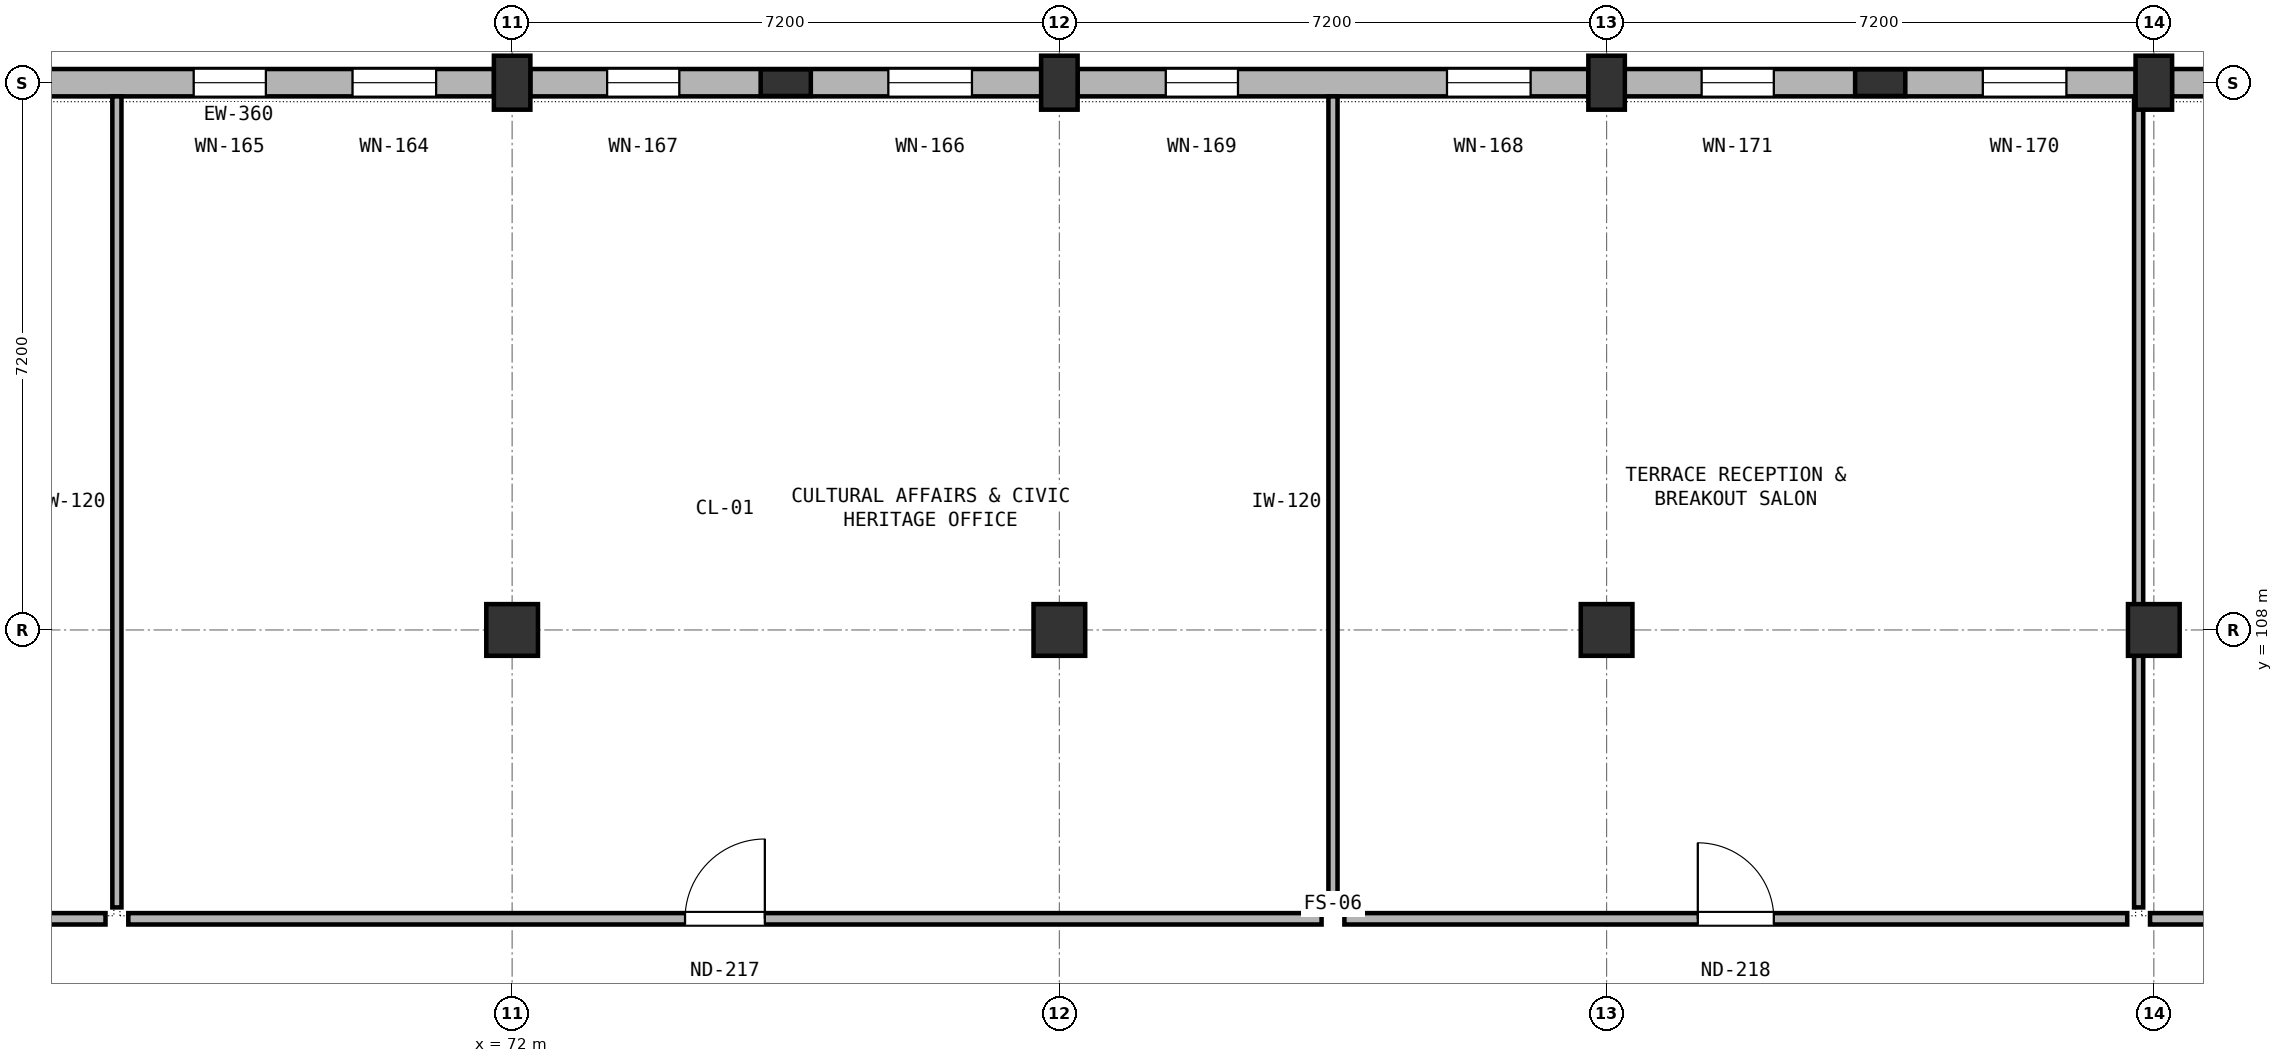
"""IFC4 building model, lengths in metres.
Left out: names, types, materials, properties, quantities, classifications, styles, units other than length and angle.
Written with IfcOpenShell. Run it as: python <this file> out.ifc"""

import sys

from ifc_helpers import new_model, si_unit, direction, frame, frame_2d, origin, origin_2d, place, context, subcontext, project, spatial, rectangle, extrude, element, fill, save


model = new_model("IFC4")
c1 = context("Model", 3, precision=1e-05, world=origin(), true_north=direction((0.0, 1.0)))
c2 = subcontext(c1, "Body", "Model", "MODEL_VIEW")
j1 = project(units=[si_unit("LENGTHUNIT", "METRE"), si_unit("PLANEANGLEUNIT", "RADIAN")], contexts=[c1])
p1 = place(None, origin())
s1 = spatial("IfcSite", under=j1, at=p1, CompositionType="ELEMENT")
p2 = place(p1, origin())
s2 = spatial("IfcBuilding", under=s1, at=p2, CompositionType="ELEMENT")
p3 = place(p2, frame((0.0, 0.0, 22.5)))
s3 = spatial("IfcBuildingStorey", under=s2, at=p3, CompositionType="ELEMENT", Elevation=22.5)
p4 = place(p3, frame((72.0, 108.0, 0.0), z_axis=(0.0, 0.0, 1.0), x_axis=(1.0, 0.0, 0.0)))
e1 = element("IfcColumn", 1, at=p4, inside=s3, PredefinedType="COLUMN", context=c2, shape_type="SweptSolid", body=[
    extrude(rectangle(XDim=0.68, YDim=0.68, at=origin_2d()), origin(), (0.0, 0.0, 1.0), 3.9),
])
p5 = place(p3, frame((72.0, 115.2, 0.0), z_axis=(0.0, 0.0, 1.0), x_axis=(1.0, 0.0, 0.0)))
e2 = element("IfcColumn", 2, at=p5, inside=s3, PredefinedType="COLUMN", context=c2, shape_type="SweptSolid", body=[
    extrude(rectangle(XDim=0.48, YDim=0.71, at=origin_2d()), origin(), (0.0, 0.0, 1.0), 3.9),
])
p6 = place(p3, frame((79.2, 108.0, 0.0), z_axis=(0.0, 0.0, 1.0), x_axis=(1.0, 0.0, 0.0)))
e3 = element("IfcColumn", 3, at=p6, inside=s3, PredefinedType="COLUMN", context=c2, shape_type="SweptSolid", body=[
    extrude(rectangle(XDim=0.68, YDim=0.68, at=origin_2d()), origin(), (0.0, 0.0, 1.0), 3.9),
])
p7 = place(p3, frame((79.2, 115.2, 0.0), z_axis=(0.0, 0.0, 1.0), x_axis=(1.0, 0.0, 0.0)))
e4 = element("IfcColumn", 4, at=p7, inside=s3, PredefinedType="COLUMN", context=c2, shape_type="SweptSolid", body=[
    extrude(rectangle(XDim=0.48, YDim=0.71, at=origin_2d()), origin(), (0.0, 0.0, 1.0), 3.9),
])
p8 = place(p3, frame((86.4, 108.0, 0.0), z_axis=(0.0, 0.0, 1.0), x_axis=(1.0, 0.0, 0.0)))
e5 = element("IfcColumn", 5, at=p8, inside=s3, PredefinedType="COLUMN", context=c2, shape_type="SweptSolid", body=[
    extrude(rectangle(XDim=0.68, YDim=0.68, at=origin_2d()), origin(), (0.0, 0.0, 1.0), 3.9),
])
p9 = place(p3, frame((86.4, 115.2, 0.0), z_axis=(0.0, 0.0, 1.0), x_axis=(1.0, 0.0, 0.0)))
e6 = element("IfcColumn", 6, at=p9, inside=s3, PredefinedType="COLUMN", context=c2, shape_type="SweptSolid", body=[
    extrude(rectangle(XDim=0.48, YDim=0.71, at=origin_2d()), origin(), (0.0, 0.0, 1.0), 3.9),
])
p10 = place(p3, frame((93.6, 108.0, 0.0), z_axis=(0.0, 0.0, 1.0), x_axis=(1.0, 0.0, 0.0)))
e7 = element("IfcColumn", 7, at=p10, inside=s3, PredefinedType="COLUMN", context=c2, shape_type="SweptSolid", body=[
    extrude(rectangle(XDim=0.68, YDim=0.68, at=origin_2d()), origin(), (0.0, 0.0, 1.0), 3.9),
])
p11 = place(p3, frame((93.6, 115.2, 0.0), z_axis=(0.0, 0.0, 1.0), x_axis=(1.0, 0.0, 0.0)))
e8 = element("IfcColumn", 8, at=p11, inside=s3, PredefinedType="COLUMN", context=c2, shape_type="SweptSolid", body=[
    extrude(rectangle(XDim=0.48, YDim=0.71, at=origin_2d()), origin(), (0.0, 0.0, 1.0), 3.9),
])
for number, where, z_axis, x_axis in (
    (9, (75.6, 115.2, 0.0), (0.0, 0.0, 1.0), (1.0, 0.0, 0.0)),
    (10, (90.0, 115.2, 0.0), (0.0, 0.0, 1.0), (1.0, 0.0, 0.0)),
):
    element("IfcColumn", number, at=place(p3, frame(where, z_axis=z_axis, x_axis=x_axis)), inside=s3, PredefinedType="PILASTER", context=c2, shape_type="SweptSolid", body=[
        extrude(rectangle(XDim=0.66, YDim=0.35, at=origin_2d()), origin(), (0.0, 0.0, 1.0), 3.9),
    ])
p12 = place(p3, frame((71.762, 115.2, 0.0), z_axis=(0.0, 0.0, 1.0), x_axis=(-1.0, 0.0, 0.0)))
e11 = element("IfcWall", 11, at=p12, inside=s3, PredefinedType="SOLIDWALL", context=c2, shape_type="SweptSolid", body=[
    extrude(rectangle(XDim=6.724, YDim=0.36, at=frame_2d((3.362, 0.0))), origin(), (0.0, 0.0, 1.0), 2.74),
])
p13 = place(p12, frame((0.762, 0.0, 0.7)))
e12 = element("IfcOpeningElement", 12, at=p13, cuts=e11, PredefinedType="OPENING", context=c2, shape_type="SweptSolid", body=[
    extrude(rectangle(XDim=1.1, YDim=1.84, at=frame_2d((0.55, 0.92))), frame((0.0, 0.19, 0.0), z_axis=(0.0, -1.0, 0.0), x_axis=(1.0, 0.0, 0.0)), (0.0, 0.0, 1.0), 0.38),
])
p14 = place(p12, frame((3.002, 0.0, 0.7)))
e13 = element("IfcOpeningElement", 13, at=p14, cuts=e11, PredefinedType="OPENING", context=c2, shape_type="SweptSolid", body=[
    extrude(rectangle(XDim=0.95, YDim=1.84, at=frame_2d((0.475, 0.92))), frame((0.0, 0.19, 0.0), z_axis=(0.0, -1.0, 0.0), x_axis=(1.0, 0.0, 0.0)), (0.0, 0.0, 1.0), 0.38),
])
p15 = place(p3, frame((78.962, 115.2, 0.0), z_axis=(0.0, 0.0, 1.0), x_axis=(-1.0, 0.0, 0.0)))
e14 = element("IfcWall", 14, at=p15, inside=s3, PredefinedType="SOLIDWALL", context=c2, shape_type="SweptSolid", body=[
    extrude(rectangle(XDim=6.724, YDim=0.36, at=frame_2d((3.362, 0.0))), origin(), (0.0, 0.0, 1.0), 2.74),
])
p16 = place(p15, frame((0.912, 0.0, 0.7)))
e15 = element("IfcOpeningElement", 15, at=p16, cuts=e14, PredefinedType="OPENING", context=c2, shape_type="SweptSolid", body=[
    extrude(rectangle(XDim=1.1, YDim=1.84, at=frame_2d((0.55, 0.92))), frame((0.0, 0.19, 0.0), z_axis=(0.0, -1.0, 0.0), x_axis=(1.0, 0.0, 0.0)), (0.0, 0.0, 1.0), 0.38),
])
p17 = place(p15, frame((4.762, 0.0, 0.7)))
e16 = element("IfcOpeningElement", 16, at=p17, cuts=e14, PredefinedType="OPENING", context=c2, shape_type="SweptSolid", body=[
    extrude(rectangle(XDim=0.95, YDim=1.84, at=frame_2d((0.475, 0.92))), frame((0.0, 0.19, 0.0), z_axis=(0.0, -1.0, 0.0), x_axis=(1.0, 0.0, 0.0)), (0.0, 0.0, 1.0), 0.38),
])
p18 = place(p3, frame((86.162, 115.2, 0.0), z_axis=(0.0, 0.0, 1.0), x_axis=(-1.0, 0.0, 0.0)))
e17 = element("IfcWall", 17, at=p18, inside=s3, PredefinedType="SOLIDWALL", context=c2, shape_type="SweptSolid", body=[
    extrude(rectangle(XDim=6.724, YDim=0.36, at=frame_2d((3.362, 0.0))), origin(), (0.0, 0.0, 1.0), 2.74),
])
p19 = place(p18, frame((0.762, 0.0, 0.7)))
e18 = element("IfcOpeningElement", 18, at=p19, cuts=e17, PredefinedType="OPENING", context=c2, shape_type="SweptSolid", body=[
    extrude(rectangle(XDim=1.1, YDim=1.84, at=frame_2d((0.55, 0.92))), frame((0.0, 0.19, 0.0), z_axis=(0.0, -1.0, 0.0), x_axis=(1.0, 0.0, 0.0)), (0.0, 0.0, 1.0), 0.38),
])
p20 = place(p18, frame((4.612, 0.0, 0.7)))
e19 = element("IfcOpeningElement", 19, at=p20, cuts=e17, PredefinedType="OPENING", context=c2, shape_type="SweptSolid", body=[
    extrude(rectangle(XDim=0.95, YDim=1.84, at=frame_2d((0.475, 0.92))), frame((0.0, 0.19, 0.0), z_axis=(0.0, -1.0, 0.0), x_axis=(1.0, 0.0, 0.0)), (0.0, 0.0, 1.0), 0.38),
])
p21 = place(p3, frame((93.362, 115.2, 0.0), z_axis=(0.0, 0.0, 1.0), x_axis=(-1.0, 0.0, 0.0)))
e20 = element("IfcWall", 20, at=p21, inside=s3, PredefinedType="SOLIDWALL", context=c2, shape_type="SweptSolid", body=[
    extrude(rectangle(XDim=6.724, YDim=0.36, at=frame_2d((3.362, 0.0))), origin(), (0.0, 0.0, 1.0), 2.74),
])
p22 = place(p21, frame((0.912, 0.0, 0.7)))
e21 = element("IfcOpeningElement", 21, at=p22, cuts=e20, PredefinedType="OPENING", context=c2, shape_type="SweptSolid", body=[
    extrude(rectangle(XDim=1.1, YDim=1.84, at=frame_2d((0.55, 0.92))), frame((0.0, 0.19, 0.0), z_axis=(0.0, -1.0, 0.0), x_axis=(1.0, 0.0, 0.0)), (0.0, 0.0, 1.0), 0.38),
])
p23 = place(p21, frame((4.762, 0.0, 0.7)))
e22 = element("IfcOpeningElement", 22, at=p23, cuts=e20, PredefinedType="OPENING", context=c2, shape_type="SweptSolid", body=[
    extrude(rectangle(XDim=0.95, YDim=1.84, at=frame_2d((0.475, 0.92))), frame((0.0, 0.19, 0.0), z_axis=(0.0, -1.0, 0.0), x_axis=(1.0, 0.0, 0.0)), (0.0, 0.0, 1.0), 0.38),
])
p24 = place(p3, frame((100.562, 115.2, 0.0), z_axis=(0.0, 0.0, 1.0), x_axis=(-1.0, 0.0, 0.0)))
e23 = element("IfcWall", 23, at=p24, inside=s3, PredefinedType="SOLIDWALL", context=c2, shape_type="SweptSolid", body=[
    extrude(rectangle(XDim=6.724, YDim=0.36, at=frame_2d((3.362, 0.0))), origin(), (0.0, 0.0, 1.0), 2.74),
])
p25 = place(p24, frame((0.762, 0.0, 0.7)))
e24 = element("IfcOpeningElement", 24, at=p25, cuts=e23, PredefinedType="OPENING", context=c2, shape_type="SweptSolid", body=[
    extrude(rectangle(XDim=1.1, YDim=1.84, at=frame_2d((0.55, 0.92))), frame((0.0, 0.19, 0.0), z_axis=(0.0, -1.0, 0.0), x_axis=(1.0, 0.0, 0.0)), (0.0, 0.0, 1.0), 0.38),
])
p26 = place(p24, frame((4.612, 0.0, 0.7)))
e25 = element("IfcOpeningElement", 25, at=p26, cuts=e23, PredefinedType="OPENING", context=c2, shape_type="SweptSolid", body=[
    extrude(rectangle(XDim=0.95, YDim=1.84, at=frame_2d((0.475, 0.92))), frame((0.0, 0.19, 0.0), z_axis=(0.0, -1.0, 0.0), x_axis=(1.0, 0.0, 0.0)), (0.0, 0.0, 1.0), 0.38),
])
p27 = place(p3, frame((52.15, 104.2, 0.0), z_axis=(0.0, 0.0, 1.0), x_axis=(1.0, 0.0, 0.0)))
e26 = element("IfcWall", 26, at=p27, inside=s3, PredefinedType="PARTITIONING", context=c2, shape_type="SweptSolid", body=[
    extrude(rectangle(XDim=14.5, YDim=0.15, at=frame_2d((7.25, 0.0))), origin(), (0.0, 0.0, 1.0), 2.78),
])
p28 = place(p27, frame((6.55, 0.0, 0.0)))
e27 = element("IfcOpeningElement", 27, at=p28, cuts=e26, PredefinedType="OPENING", context=c2, shape_type="SweptSolid", body=[
    extrude(rectangle(XDim=1.4, YDim=2.2, at=frame_2d((0.7, 1.1))), frame((0.0, 0.085, 0.0), z_axis=(0.0, -1.0, 0.0), x_axis=(1.0, 0.0, 0.0)), (0.0, 0.0, 1.0), 0.17),
])
p29 = place(p3, frame((66.95, 104.2, 0.0), z_axis=(0.0, 0.0, 1.0), x_axis=(1.0, 0.0, 0.0)))
e28 = element("IfcWall", 28, at=p29, inside=s3, PredefinedType="PARTITIONING", context=c2, shape_type="SweptSolid", body=[
    extrude(rectangle(XDim=15.7, YDim=0.15, at=frame_2d((7.85, 0.0))), origin(), (0.0, 0.0, 1.0), 2.78),
])
p30 = place(p29, frame((7.325, 0.0, 0.0)))
e29 = element("IfcOpeningElement", 29, at=p30, cuts=e28, PredefinedType="OPENING", context=c2, shape_type="SweptSolid", body=[
    extrude(rectangle(XDim=1.05, YDim=2.15, at=frame_2d((0.525, 1.075))), frame((0.0, 0.085, 0.0), z_axis=(0.0, -1.0, 0.0), x_axis=(1.0, 0.0, 0.0)), (0.0, 0.0, 1.0), 0.17),
])
p31 = place(p3, frame((66.8, 104.35, 0.0), z_axis=(0.0, 0.0, 1.0), x_axis=(0.0, 1.0, 0.0)))
e30 = element("IfcWall", 30, at=p31, inside=s3, PredefinedType="PARTITIONING", context=c2, shape_type="SweptSolid", body=[
    extrude(rectangle(XDim=10.67, YDim=0.12, at=frame_2d((5.335, 0.0))), origin(), (0.0, 0.0, 1.0), 2.78),
])
p32 = place(p3, frame((82.95, 104.2, 0.0), z_axis=(0.0, 0.0, 1.0), x_axis=(1.0, 0.0, 0.0)))
e31 = element("IfcWall", 31, at=p32, inside=s3, PredefinedType="PARTITIONING", context=c2, shape_type="SweptSolid", body=[
    extrude(rectangle(XDim=10.3, YDim=0.15, at=frame_2d((5.15, 0.0))), origin(), (0.0, 0.0, 1.0), 2.78),
])
p33 = place(p32, frame((4.65, 0.0, 0.0)))
e32 = element("IfcOpeningElement", 32, at=p33, cuts=e31, PredefinedType="OPENING", context=c2, shape_type="SweptSolid", body=[
    extrude(rectangle(XDim=1.0, YDim=2.15, at=frame_2d((0.5, 1.075))), frame((0.0, 0.085, 0.0), z_axis=(0.0, -1.0, 0.0), x_axis=(1.0, 0.0, 0.0)), (0.0, 0.0, 1.0), 0.17),
])
p34 = place(p3, frame((82.8, 104.35, 0.0), z_axis=(0.0, 0.0, 1.0), x_axis=(0.0, 1.0, 0.0)))
e33 = element("IfcWall", 33, at=p34, inside=s3, PredefinedType="PARTITIONING", context=c2, shape_type="SweptSolid", body=[
    extrude(rectangle(XDim=10.67, YDim=0.12, at=frame_2d((5.335, 0.0))), origin(), (0.0, 0.0, 1.0), 2.78),
])
p35 = place(p3, frame((93.55, 104.2, 0.0), z_axis=(0.0, 0.0, 1.0), x_axis=(1.0, 0.0, 0.0)))
e34 = element("IfcWall", 34, at=p35, inside=s3, PredefinedType="PARTITIONING", context=c2, shape_type="SweptSolid", body=[
    extrude(rectangle(XDim=6.5, YDim=0.15, at=frame_2d((3.25, 0.0))), origin(), (0.0, 0.0, 1.0), 2.78),
])
p36 = place(p35, frame((2.725, 0.0, 0.0)))
e35 = element("IfcOpeningElement", 35, at=p36, cuts=e34, PredefinedType="OPENING", context=c2, shape_type="SweptSolid", body=[
    extrude(rectangle(XDim=1.05, YDim=2.15, at=frame_2d((0.525, 1.075))), frame((0.0, 0.085, 0.0), z_axis=(0.0, -1.0, 0.0), x_axis=(1.0, 0.0, 0.0)), (0.0, 0.0, 1.0), 0.17),
])
p37 = place(p3, frame((93.4, 104.35, 0.0), z_axis=(0.0, 0.0, 1.0), x_axis=(0.0, 1.0, 0.0)))
e36 = element("IfcWall", 36, at=p37, inside=s3, PredefinedType="PARTITIONING", context=c2, shape_type="SweptSolid", body=[
    extrude(rectangle(XDim=10.67, YDim=0.12, at=frame_2d((5.335, 0.0))), origin(), (0.0, 0.0, 1.0), 2.78),
])
p38 = place(p13, origin())
e37 = element("IfcWindow", 37, at=p38, inside=s3, PartitioningType="SINGLE_PANEL", PredefinedType="WINDOW", context=c2, shape_type="SweptSolid", body=[
    extrude(rectangle(XDim=1.1, YDim=1.84, at=frame_2d((0.55, 0.92))), frame((0.0, 0.03, 0.0), z_axis=(0.0, -1.0, 0.0), x_axis=(1.0, 0.0, 0.0)), (0.0, 0.0, 1.0), 0.06),
])
fill(e12, e37)
p39 = place(p14, origin())
e38 = element("IfcWindow", 38, at=p39, inside=s3, PartitioningType="SINGLE_PANEL", PredefinedType="WINDOW", context=c2, shape_type="SweptSolid", body=[
    extrude(rectangle(XDim=0.95, YDim=1.84, at=frame_2d((0.475, 0.92))), frame((0.0, 0.03, 0.0), z_axis=(0.0, -1.0, 0.0), x_axis=(1.0, 0.0, 0.0)), (0.0, 0.0, 1.0), 0.06),
])
fill(e13, e38)
p40 = place(p16, origin())
e39 = element("IfcWindow", 39, at=p40, inside=s3, PartitioningType="SINGLE_PANEL", PredefinedType="WINDOW", context=c2, shape_type="SweptSolid", body=[
    extrude(rectangle(XDim=1.1, YDim=1.84, at=frame_2d((0.55, 0.92))), frame((0.0, 0.03, 0.0), z_axis=(0.0, -1.0, 0.0), x_axis=(1.0, 0.0, 0.0)), (0.0, 0.0, 1.0), 0.06),
])
fill(e15, e39)
p41 = place(p17, origin())
e40 = element("IfcWindow", 40, at=p41, inside=s3, PartitioningType="SINGLE_PANEL", PredefinedType="WINDOW", context=c2, shape_type="SweptSolid", body=[
    extrude(rectangle(XDim=0.95, YDim=1.84, at=frame_2d((0.475, 0.92))), frame((0.0, 0.03, 0.0), z_axis=(0.0, -1.0, 0.0), x_axis=(1.0, 0.0, 0.0)), (0.0, 0.0, 1.0), 0.06),
])
fill(e16, e40)
p42 = place(p19, origin())
e41 = element("IfcWindow", 41, at=p42, inside=s3, PartitioningType="SINGLE_PANEL", PredefinedType="WINDOW", context=c2, shape_type="SweptSolid", body=[
    extrude(rectangle(XDim=1.1, YDim=1.84, at=frame_2d((0.55, 0.92))), frame((0.0, 0.03, 0.0), z_axis=(0.0, -1.0, 0.0), x_axis=(1.0, 0.0, 0.0)), (0.0, 0.0, 1.0), 0.06),
])
fill(e18, e41)
p43 = place(p20, origin())
e42 = element("IfcWindow", 42, at=p43, inside=s3, PartitioningType="SINGLE_PANEL", PredefinedType="WINDOW", context=c2, shape_type="SweptSolid", body=[
    extrude(rectangle(XDim=0.95, YDim=1.84, at=frame_2d((0.475, 0.92))), frame((0.0, 0.03, 0.0), z_axis=(0.0, -1.0, 0.0), x_axis=(1.0, 0.0, 0.0)), (0.0, 0.0, 1.0), 0.06),
])
fill(e19, e42)
p44 = place(p22, origin())
e43 = element("IfcWindow", 43, at=p44, inside=s3, PartitioningType="SINGLE_PANEL", PredefinedType="WINDOW", context=c2, shape_type="SweptSolid", body=[
    extrude(rectangle(XDim=1.1, YDim=1.84, at=frame_2d((0.55, 0.92))), frame((0.0, 0.03, 0.0), z_axis=(0.0, -1.0, 0.0), x_axis=(1.0, 0.0, 0.0)), (0.0, 0.0, 1.0), 0.06),
])
fill(e21, e43)
p45 = place(p23, origin())
e44 = element("IfcWindow", 44, at=p45, inside=s3, PartitioningType="SINGLE_PANEL", PredefinedType="WINDOW", context=c2, shape_type="SweptSolid", body=[
    extrude(rectangle(XDim=0.95, YDim=1.84, at=frame_2d((0.475, 0.92))), frame((0.0, 0.03, 0.0), z_axis=(0.0, -1.0, 0.0), x_axis=(1.0, 0.0, 0.0)), (0.0, 0.0, 1.0), 0.06),
])
fill(e22, e44)
p46 = place(p30, origin())
e45 = element("IfcDoor", 45, at=p46, inside=s3, OperationType="SINGLE_SWING_RIGHT", PredefinedType="DOOR", context=c2, shape_type="SweptSolid", body=[
    extrude(rectangle(XDim=1.05, YDim=2.15, at=frame_2d((0.525, 1.075))), frame((0.0, 0.025, 0.0), z_axis=(0.0, -1.0, 0.0), x_axis=(1.0, 0.0, 0.0)), (0.0, 0.0, 1.0), 0.05),
])
fill(e29, e45)
p47 = place(p33, origin())
e46 = element("IfcDoor", 46, at=p47, inside=s3, OperationType="SINGLE_SWING_LEFT", PredefinedType="DOOR", context=c2, shape_type="SweptSolid", body=[
    extrude(rectangle(XDim=1.0, YDim=2.15, at=frame_2d((0.5, 1.075))), frame((0.0, 0.025, 0.0), z_axis=(0.0, -1.0, 0.0), x_axis=(1.0, 0.0, 0.0)), (0.0, 0.0, 1.0), 0.05),
])
fill(e32, e46)
save(model, sys.argv[1])
